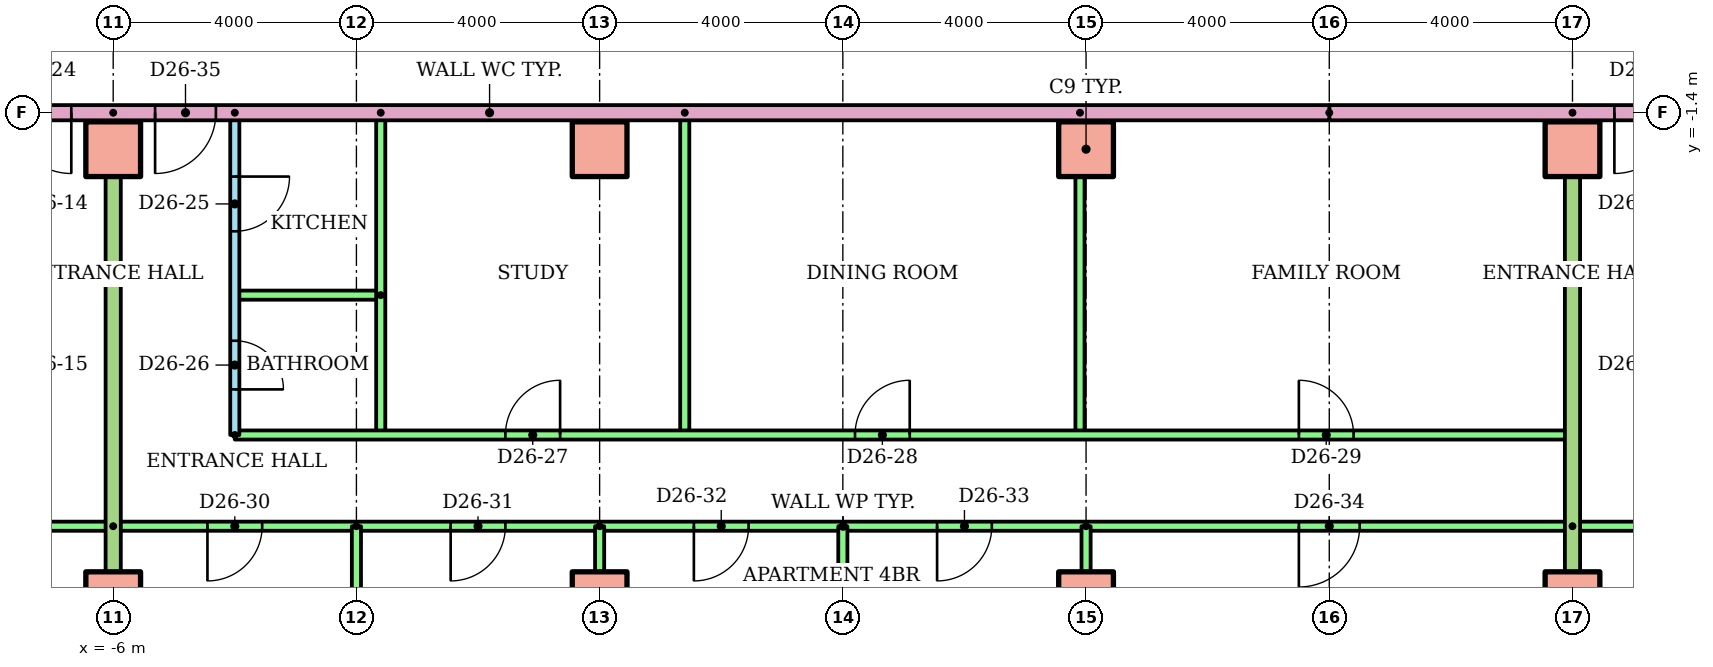
"""IFC4 building model, lengths in metres.
Left out: names, types, materials, properties, quantities, classifications, styles, units other than length and angle.
Written with IfcOpenShell. Run it as: python <this file> out.ifc"""

import sys

from ifc_helpers import new_model, si_unit, direction, frame, frame_2d, origin, origin_2d, place, context, subcontext, project, spatial, rectangle, extrude, element, fill, save


model = new_model("IFC4")
c1 = context("Model", 3, precision=1e-05, world=origin(), true_north=direction((0.0, 1.0)))
c2 = subcontext(c1, "Body", "Model", "MODEL_VIEW")
j1 = project(units=[si_unit("LENGTHUNIT", "METRE"), si_unit("PLANEANGLEUNIT", "RADIAN")], contexts=[c1])
p1 = place(None, origin())
s1 = spatial("IfcSite", under=j1, at=p1, CompositionType="ELEMENT")
p2 = place(p1, origin())
s2 = spatial("IfcBuilding", under=s1, at=p2, CompositionType="ELEMENT")
p3 = place(p2, frame((0.0, 0.0, 99.9)))
s3 = spatial("IfcBuildingStorey", under=s2, at=p3, CompositionType="ELEMENT", Elevation=99.9)
for number, where in (
    (1, (-6.0, -9.4, 0.0)),
    (2, (2.0, -9.4, 0.0)),
    (3, (10.0, -9.4, 0.0)),
    (4, (18.0, -9.4, 0.0)),
    (5, (-6.0, -2.0, 0.0)),
    (6, (2.0, -2.0, 0.0)),
    (7, (10.0, -2.0, 0.0)),
    (8, (18.0, -2.0, 0.0)),
):
    element("IfcColumn", number, at=place(p3, frame(where)), inside=s3, PredefinedType="COLUMN", context=c2, shape_type="SweptSolid", body=[
        extrude(rectangle(XDim=0.9, YDim=0.9, at=origin_2d()), origin(), (0.0, 0.0, 1.0), 3.2),
    ])
p4 = place(p3, frame((-6.0, -8.2, 0.0), z_axis=(0.0, 0.0, 1.0), x_axis=(-1.0, 0.0, 0.0)))
e9 = element("IfcWall", 9, at=p4, inside=s3, PredefinedType="PARTITIONING", context=c2, shape_type="SweptSolid", body=[
    extrude(rectangle(XDim=22.61, YDim=0.15, at=frame_2d((11.305, 0.0))), origin(), (0.0, 0.0, 1.0), 2.4),
])
p5 = place(p4, frame((19.7, 0.0, 0.0)))
e10 = element("IfcOpeningElement", 10, at=p5, cuts=e9, PredefinedType="OPENING", context=c2, shape_type="SweptSolid", body=[
    extrude(rectangle(XDim=0.9, YDim=2.1, at=frame_2d((0.45, 1.05))), frame((0.0, 0.085, 0.0), z_axis=(0.0, -1.0, 0.0), x_axis=(1.0, 0.0, 0.0)), (0.0, 0.0, 1.0), 0.17),
])
p6 = place(p4, frame((14.411, 0.0, 0.0)))
e11 = element("IfcOpeningElement", 11, at=p6, cuts=e9, PredefinedType="OPENING", context=c2, shape_type="SweptSolid", body=[
    extrude(rectangle(XDim=0.9, YDim=2.1, at=frame_2d((0.45, 1.05))), frame((0.0, 0.085, 0.0), z_axis=(0.0, -1.0, 0.0), x_axis=(1.0, 0.0, 0.0)), (0.0, 0.0, 1.0), 0.17),
])
p7 = place(p4, frame((9.55, 0.0, 0.0)))
e12 = element("IfcOpeningElement", 12, at=p7, cuts=e9, PredefinedType="OPENING", context=c2, shape_type="SweptSolid", body=[
    extrude(rectangle(XDim=0.9, YDim=2.1, at=frame_2d((0.45, 1.05))), frame((0.0, 0.085, 0.0), z_axis=(0.0, -1.0, 0.0), x_axis=(1.0, 0.0, 0.0)), (0.0, 0.0, 1.0), 0.17),
])
p8 = place(p4, frame((5.55, 0.0, 0.0)))
e13 = element("IfcOpeningElement", 13, at=p8, cuts=e9, PredefinedType="OPENING", context=c2, shape_type="SweptSolid", body=[
    extrude(rectangle(XDim=0.9, YDim=2.1, at=frame_2d((0.45, 1.05))), frame((0.0, 0.085, 0.0), z_axis=(0.0, -1.0, 0.0), x_axis=(1.0, 0.0, 0.0)), (0.0, 0.0, 1.0), 0.17),
])
p9 = place(p4, frame((1.5, 0.0, 0.0)))
e14 = element("IfcOpeningElement", 14, at=p9, cuts=e9, PredefinedType="OPENING", context=c2, shape_type="SweptSolid", body=[
    extrude(rectangle(XDim=1.0, YDim=2.1, at=frame_2d((0.5, 1.05))), frame((0.0, 0.085, 0.0), z_axis=(0.0, -1.0, 0.0), x_axis=(1.0, 0.0, 0.0)), (0.0, 0.0, 1.0), 0.17),
])
p10 = place(p3, frame((-4.0, -1.4, 0.0), z_axis=(0.0, 0.0, 1.0), x_axis=(0.0, -1.0, 0.0)))
e15 = element("IfcWall", 15, at=p10, inside=s3, PredefinedType="PARTITIONING", context=c2, shape_type="SweptSolid", body=[
    extrude(rectangle(XDim=5.3, YDim=0.15, at=frame_2d((2.65, 0.0))), origin(), (0.0, 0.0, 1.0), 2.4),
])
p11 = place(p10, frame((1.05, 0.0, 0.0)))
e16 = element("IfcOpeningElement", 16, at=p11, cuts=e15, PredefinedType="OPENING", context=c2, shape_type="SweptSolid", body=[
    extrude(rectangle(XDim=0.9, YDim=2.1, at=frame_2d((0.45, 1.05))), frame((0.0, 0.085, 0.0), z_axis=(0.0, -1.0, 0.0), x_axis=(1.0, 0.0, 0.0)), (0.0, 0.0, 1.0), 0.17),
])
p12 = place(p10, frame((3.75, 0.0, 0.0)))
e17 = element("IfcOpeningElement", 17, at=p12, cuts=e15, PredefinedType="OPENING", context=c2, shape_type="SweptSolid", body=[
    extrude(rectangle(XDim=0.8, YDim=2.1, at=frame_2d((0.4, 1.05))), frame((0.0, 0.085, 0.0), z_axis=(0.0, -1.0, 0.0), x_axis=(1.0, 0.0, 0.0)), (0.0, 0.0, 1.0), 0.17),
])
p13 = place(p3, frame((-1.6, -4.4, 0.0), z_axis=(0.0, 0.0, 1.0), x_axis=(-1.0, 0.0, 0.0)))
e18 = element("IfcWall", 18, at=p13, inside=s3, PredefinedType="PARTITIONING", context=c2, shape_type="SweptSolid", body=[
    extrude(rectangle(XDim=2.4, YDim=0.15, at=frame_2d((1.2, 0.0))), origin(), (0.0, 0.0, 1.0), 2.4),
])
for number, where, z_axis, x_axis in (
    (19, (-1.6, -1.4, 0.0), (0.0, 0.0, 1.0), (0.0, -1.0, 0.0)),
    (20, (3.4, -1.4, 0.0), (0.0, 0.0, 1.0), (0.0, -1.0, 0.0)),
    (21, (9.9, -1.4, 0.0), (0.0, 0.0, 1.0), (0.0, -1.0, 0.0)),
):
    element("IfcWall", number, at=place(p3, frame(where, z_axis=z_axis, x_axis=x_axis)), inside=s3, PredefinedType="PARTITIONING", context=c2, shape_type="SweptSolid", body=[
        extrude(rectangle(XDim=5.3, YDim=0.15, at=frame_2d((2.65, 0.0))), origin(), (0.0, 0.0, 1.0), 2.4),
    ])
p14 = place(p3, frame((-4.0, -6.7, 0.0)))
e22 = element("IfcWall", 22, at=p14, inside=s3, PredefinedType="PARTITIONING", context=c2, shape_type="SweptSolid", body=[
    extrude(rectangle(XDim=22.0, YDim=0.15, at=frame_2d((11.0, 0.0))), origin(), (0.0, 0.0, 1.0), 2.4),
])
p15 = place(p14, frame((4.45, 0.0, 0.0)))
e23 = element("IfcOpeningElement", 23, at=p15, cuts=e22, PredefinedType="OPENING", context=c2, shape_type="SweptSolid", body=[
    extrude(rectangle(XDim=0.9, YDim=2.1, at=frame_2d((0.45, 1.05))), frame((0.0, 0.085, 0.0), z_axis=(0.0, -1.0, 0.0), x_axis=(1.0, 0.0, 0.0)), (0.0, 0.0, 1.0), 0.17),
])
p16 = place(p14, frame((10.2, 0.0, 0.0)))
e24 = element("IfcOpeningElement", 24, at=p16, cuts=e22, PredefinedType="OPENING", context=c2, shape_type="SweptSolid", body=[
    extrude(rectangle(XDim=0.9, YDim=2.1, at=frame_2d((0.45, 1.05))), frame((0.0, 0.085, 0.0), z_axis=(0.0, -1.0, 0.0), x_axis=(1.0, 0.0, 0.0)), (0.0, 0.0, 1.0), 0.17),
])
p17 = place(p14, frame((17.5, 0.0, 0.0)))
e25 = element("IfcOpeningElement", 25, at=p17, cuts=e22, PredefinedType="OPENING", context=c2, shape_type="SweptSolid", body=[
    extrude(rectangle(XDim=0.9, YDim=2.1, at=frame_2d((0.45, 1.05))), frame((0.0, 0.085, 0.0), z_axis=(0.0, -1.0, 0.0), x_axis=(1.0, 0.0, 0.0)), (0.0, 0.0, 1.0), 0.17),
])
p18 = place(p3, frame((18.0, -8.2, 0.0), z_axis=(0.0, 0.0, 1.0), x_axis=(-1.0, 0.0, 0.0)))
e26 = element("IfcWall", 26, at=p18, inside=s3, PredefinedType="PARTITIONING", context=c2, shape_type="SweptSolid", body=[
    extrude(rectangle(XDim=24.0, YDim=0.15, at=frame_2d((12.0, 0.0))), origin(), (0.0, 0.0, 1.0), 2.4),
])
p19 = place(p18, frame((21.55, 0.0, 0.0)))
e27 = element("IfcOpeningElement", 27, at=p19, cuts=e26, PredefinedType="OPENING", context=c2, shape_type="SweptSolid", body=[
    extrude(rectangle(XDim=0.9, YDim=2.1, at=frame_2d((0.45, 1.05))), frame((0.0, 0.085, 0.0), z_axis=(0.0, -1.0, 0.0), x_axis=(1.0, 0.0, 0.0)), (0.0, 0.0, 1.0), 0.17),
])
p20 = place(p18, frame((17.55, 0.0, 0.0)))
e28 = element("IfcOpeningElement", 28, at=p20, cuts=e26, PredefinedType="OPENING", context=c2, shape_type="SweptSolid", body=[
    extrude(rectangle(XDim=0.9, YDim=2.1, at=frame_2d((0.45, 1.05))), frame((0.0, 0.085, 0.0), z_axis=(0.0, -1.0, 0.0), x_axis=(1.0, 0.0, 0.0)), (0.0, 0.0, 1.0), 0.17),
])
p21 = place(p18, frame((13.55, 0.0, 0.0)))
e29 = element("IfcOpeningElement", 29, at=p21, cuts=e26, PredefinedType="OPENING", context=c2, shape_type="SweptSolid", body=[
    extrude(rectangle(XDim=0.9, YDim=2.1, at=frame_2d((0.45, 1.05))), frame((0.0, 0.085, 0.0), z_axis=(0.0, -1.0, 0.0), x_axis=(1.0, 0.0, 0.0)), (0.0, 0.0, 1.0), 0.17),
])
p22 = place(p18, frame((9.55, 0.0, 0.0)))
e30 = element("IfcOpeningElement", 30, at=p22, cuts=e26, PredefinedType="OPENING", context=c2, shape_type="SweptSolid", body=[
    extrude(rectangle(XDim=0.9, YDim=2.1, at=frame_2d((0.45, 1.05))), frame((0.0, 0.085, 0.0), z_axis=(0.0, -1.0, 0.0), x_axis=(1.0, 0.0, 0.0)), (0.0, 0.0, 1.0), 0.17),
])
p23 = place(p18, frame((3.5, 0.0, 0.0)))
e31 = element("IfcOpeningElement", 31, at=p23, cuts=e26, PredefinedType="OPENING", context=c2, shape_type="SweptSolid", body=[
    extrude(rectangle(XDim=1.0, YDim=2.1, at=frame_2d((0.5, 1.05))), frame((0.0, 0.085, 0.0), z_axis=(0.0, -1.0, 0.0), x_axis=(1.0, 0.0, 0.0)), (0.0, 0.0, 1.0), 0.17),
])
p24 = place(p3, frame((-2.0, -8.2, 0.0), z_axis=(0.0, 0.0, 1.0), x_axis=(0.0, -1.0, 0.0)))
e32 = element("IfcWall", 32, at=p24, inside=s3, PredefinedType="PARTITIONING", context=c2, shape_type="SweptSolid", body=[
    extrude(rectangle(XDim=8.021, YDim=0.15, at=frame_2d((4.01, 0.0))), origin(), (0.0, 0.0, 1.0), 2.4),
])
p25 = place(p3, frame((2.0, -8.2, 0.0), z_axis=(0.0, 0.0, 1.0), x_axis=(0.0, -1.0, 0.0)))
e33 = element("IfcWall", 33, at=p25, inside=s3, PredefinedType="PARTITIONING", context=c2, shape_type="SweptSolid", body=[
    extrude(rectangle(XDim=8.01, YDim=0.15, at=frame_2d((4.005, 0.0))), origin(), (0.0, 0.0, 1.0), 2.4),
])
p26 = place(p3, frame((6.0, -8.2, 0.0), z_axis=(0.0, 0.0, 1.0), x_axis=(0.0, -1.0, 0.0)))
e34 = element("IfcWall", 34, at=p26, inside=s3, PredefinedType="PARTITIONING", context=c2, shape_type="SweptSolid", body=[
    extrude(rectangle(XDim=8.021, YDim=0.15, at=frame_2d((4.01, 0.0))), origin(), (0.0, 0.0, 1.0), 2.4),
])
p27 = place(p3, frame((10.0, -8.2, 0.0), z_axis=(0.0, 0.0, 1.0), x_axis=(0.0, -1.0, 0.0)))
e35 = element("IfcWall", 35, at=p27, inside=s3, PredefinedType="PARTITIONING", context=c2, shape_type="SweptSolid", body=[
    extrude(rectangle(XDim=8.01, YDim=0.15, at=frame_2d((4.005, 0.0))), origin(), (0.0, 0.0, 1.0), 2.4),
])
p28 = place(p3, frame((-6.0, -1.4, 0.0), z_axis=(0.0, 0.0, 1.0), x_axis=(0.0, -1.0, 0.0)))
e36 = element("IfcWall", 36, at=p28, inside=s3, PredefinedType="PARTITIONING", context=c2, shape_type="SweptSolid", body=[
    extrude(rectangle(XDim=14.81, YDim=0.25, at=frame_2d((7.405, 0.0))), origin(), (0.0, 0.0, 1.0), 2.4),
])
p29 = place(p3, frame((40.62, -8.2, 0.0), z_axis=(0.0, 0.0, 1.0), x_axis=(-1.0, 0.0, 0.0)))
e37 = element("IfcWall", 37, at=p29, inside=s3, PredefinedType="PARTITIONING", context=c2, shape_type="SweptSolid", body=[
    extrude(rectangle(XDim=22.62, YDim=0.15, at=frame_2d((11.31, 0.0))), origin(), (0.0, 0.0, 1.0), 2.4),
])
p30 = place(p29, frame((18.12, 0.0, 0.0)))
e38 = element("IfcOpeningElement", 38, at=p30, cuts=e37, PredefinedType="OPENING", context=c2, shape_type="SweptSolid", body=[
    extrude(rectangle(XDim=1.0, YDim=2.1, at=frame_2d((0.5, 1.05))), frame((0.0, 0.085, 0.0), z_axis=(0.0, -1.0, 0.0), x_axis=(1.0, 0.0, 0.0)), (0.0, 0.0, 1.0), 0.17),
])
p31 = place(p29, frame((12.17, 0.0, 0.0)))
e39 = element("IfcOpeningElement", 39, at=p31, cuts=e37, PredefinedType="OPENING", context=c2, shape_type="SweptSolid", body=[
    extrude(rectangle(XDim=0.9, YDim=2.1, at=frame_2d((0.45, 1.05))), frame((0.0, 0.085, 0.0), z_axis=(0.0, -1.0, 0.0), x_axis=(1.0, 0.0, 0.0)), (0.0, 0.0, 1.0), 0.17),
])
p32 = place(p29, frame((8.17, 0.0, 0.0)))
e40 = element("IfcOpeningElement", 40, at=p32, cuts=e37, PredefinedType="OPENING", context=c2, shape_type="SweptSolid", body=[
    extrude(rectangle(XDim=0.9, YDim=2.1, at=frame_2d((0.45, 1.05))), frame((0.0, 0.085, 0.0), z_axis=(0.0, -1.0, 0.0), x_axis=(1.0, 0.0, 0.0)), (0.0, 0.0, 1.0), 0.17),
])
p33 = place(p29, frame((2.97, 0.0, 0.0)))
e41 = element("IfcOpeningElement", 41, at=p33, cuts=e37, PredefinedType="OPENING", context=c2, shape_type="SweptSolid", body=[
    extrude(rectangle(XDim=0.9, YDim=2.1, at=frame_2d((0.45, 1.05))), frame((0.0, 0.085, 0.0), z_axis=(0.0, -1.0, 0.0), x_axis=(1.0, 0.0, 0.0)), (0.0, 0.0, 1.0), 0.17),
])
p34 = place(p3, frame((18.0, -1.4, 0.0), z_axis=(0.0, 0.0, 1.0), x_axis=(0.0, -1.0, 0.0)))
e42 = element("IfcWall", 42, at=p34, inside=s3, PredefinedType="PARTITIONING", context=c2, shape_type="SweptSolid", body=[
    extrude(rectangle(XDim=14.81, YDim=0.25, at=frame_2d((7.405, 0.0))), origin(), (0.0, 0.0, 1.0), 2.4),
])
p35 = place(p3, frame((29.0, -1.4, 0.0), z_axis=(0.0, 0.0, 1.0), x_axis=(-1.0, 0.0, 0.0)))
e43 = element("IfcWall", 43, at=p35, inside=s3, PredefinedType="PARTITIONING", context=c2, shape_type="SweptSolid", body=[
    extrude(rectangle(XDim=15.0, YDim=0.25, at=frame_2d((7.5, 0.0))), origin(), (0.0, 0.0, 1.0), 2.4),
])
p36 = place(p35, frame((9.311, 0.0, 0.0)))
e44 = element("IfcOpeningElement", 44, at=p36, cuts=e43, PredefinedType="OPENING", context=c2, shape_type="SweptSolid", body=[
    extrude(rectangle(XDim=1.0, YDim=2.1, at=frame_2d((0.5, 1.05))), frame((0.0, 0.135, 0.0), z_axis=(0.0, -1.0, 0.0), x_axis=(1.0, 0.0, 0.0)), (0.0, 0.0, 1.0), 0.27),
])
p37 = place(p3, frame((14.0, -1.4, 0.0), z_axis=(0.0, 0.0, 1.0), x_axis=(-1.0, 0.0, 0.0)))
e45 = element("IfcWall", 45, at=p37, inside=s3, PredefinedType="PARTITIONING", context=c2, shape_type="SweptSolid", body=[
    extrude(rectangle(XDim=28.0, YDim=0.25, at=frame_2d((14.0, 0.0))), origin(), (0.0, 0.0, 1.0), 2.4),
])
p38 = place(p37, frame((20.689, 0.0, 0.0)))
e46 = element("IfcOpeningElement", 46, at=p38, cuts=e45, PredefinedType="OPENING", context=c2, shape_type="SweptSolid", body=[
    extrude(rectangle(XDim=1.0, YDim=2.1, at=frame_2d((0.5, 1.05))), frame((0.0, 0.135, 0.0), z_axis=(0.0, -1.0, 0.0), x_axis=(1.0, 0.0, 0.0)), (0.0, 0.0, 1.0), 0.27),
])
p39 = place(p37, frame((18.311, 0.0, 0.0)))
e47 = element("IfcOpeningElement", 47, at=p39, cuts=e45, PredefinedType="OPENING", context=c2, shape_type="SweptSolid", body=[
    extrude(rectangle(XDim=1.0, YDim=2.1, at=frame_2d((0.5, 1.05))), frame((0.0, 0.135, 0.0), z_axis=(0.0, -1.0, 0.0), x_axis=(1.0, 0.0, 0.0)), (0.0, 0.0, 1.0), 0.27),
])
p40 = place(p38, origin())
e48 = element("IfcDoor", 48, at=p40, inside=s3, OperationType="SINGLE_SWING_LEFT", PredefinedType="DOOR", context=c2, shape_type="SweptSolid", body=[
    extrude(rectangle(XDim=1.0, YDim=2.1, at=frame_2d((0.5, 1.05))), frame((0.0, 0.025, 0.0), z_axis=(0.0, -1.0, 0.0), x_axis=(1.0, 0.0, 0.0)), (0.0, 0.0, 1.0), 0.05),
])
fill(e46, e48)
p41 = place(p11, origin())
e49 = element("IfcDoor", 49, at=p41, inside=s3, OperationType="SINGLE_SWING_LEFT", PredefinedType="DOOR", context=c2, shape_type="SweptSolid", body=[
    extrude(rectangle(XDim=0.9, YDim=2.1, at=frame_2d((0.45, 1.05))), frame((0.0, 0.025, 0.0), z_axis=(0.0, -1.0, 0.0), x_axis=(1.0, 0.0, 0.0)), (0.0, 0.0, 1.0), 0.05),
])
fill(e16, e49)
p42 = place(p12, origin())
e50 = element("IfcDoor", 50, at=p42, inside=s3, OperationType="SINGLE_SWING_RIGHT", PredefinedType="DOOR", context=c2, shape_type="SweptSolid", body=[
    extrude(rectangle(XDim=0.8, YDim=2.1, at=frame_2d((0.4, 1.05))), frame((0.0, 0.025, 0.0), z_axis=(0.0, -1.0, 0.0), x_axis=(1.0, 0.0, 0.0)), (0.0, 0.0, 1.0), 0.05),
])
fill(e17, e50)
p43 = place(p15, origin())
e51 = element("IfcDoor", 51, at=p43, inside=s3, OperationType="SINGLE_SWING_RIGHT", PredefinedType="DOOR", context=c2, shape_type="SweptSolid", body=[
    extrude(rectangle(XDim=0.9, YDim=2.1, at=frame_2d((0.45, 1.05))), frame((0.0, 0.025, 0.0), z_axis=(0.0, -1.0, 0.0), x_axis=(1.0, 0.0, 0.0)), (0.0, 0.0, 1.0), 0.05),
])
fill(e23, e51)
p44 = place(p16, origin())
e52 = element("IfcDoor", 52, at=p44, inside=s3, OperationType="SINGLE_SWING_RIGHT", PredefinedType="DOOR", context=c2, shape_type="SweptSolid", body=[
    extrude(rectangle(XDim=0.9, YDim=2.1, at=frame_2d((0.45, 1.05))), frame((0.0, 0.025, 0.0), z_axis=(0.0, -1.0, 0.0), x_axis=(1.0, 0.0, 0.0)), (0.0, 0.0, 1.0), 0.05),
])
fill(e24, e52)
p45 = place(p17, origin())
e53 = element("IfcDoor", 53, at=p45, inside=s3, OperationType="SINGLE_SWING_LEFT", PredefinedType="DOOR", context=c2, shape_type="SweptSolid", body=[
    extrude(rectangle(XDim=0.9, YDim=2.1, at=frame_2d((0.45, 1.05))), frame((0.0, 0.025, 0.0), z_axis=(0.0, -1.0, 0.0), x_axis=(1.0, 0.0, 0.0)), (0.0, 0.0, 1.0), 0.05),
])
fill(e25, e53)
p46 = place(p19, origin())
e54 = element("IfcDoor", 54, at=p46, inside=s3, OperationType="SINGLE_SWING_RIGHT", PredefinedType="DOOR", context=c2, shape_type="SweptSolid", body=[
    extrude(rectangle(XDim=0.9, YDim=2.1, at=frame_2d((0.45, 1.05))), frame((0.0, 0.025, 0.0), z_axis=(0.0, -1.0, 0.0), x_axis=(1.0, 0.0, 0.0)), (0.0, 0.0, 1.0), 0.05),
])
fill(e27, e54)
p47 = place(p20, origin())
e55 = element("IfcDoor", 55, at=p47, inside=s3, OperationType="SINGLE_SWING_RIGHT", PredefinedType="DOOR", context=c2, shape_type="SweptSolid", body=[
    extrude(rectangle(XDim=0.9, YDim=2.1, at=frame_2d((0.45, 1.05))), frame((0.0, 0.025, 0.0), z_axis=(0.0, -1.0, 0.0), x_axis=(1.0, 0.0, 0.0)), (0.0, 0.0, 1.0), 0.05),
])
fill(e28, e55)
p48 = place(p21, origin())
e56 = element("IfcDoor", 56, at=p48, inside=s3, OperationType="SINGLE_SWING_RIGHT", PredefinedType="DOOR", context=c2, shape_type="SweptSolid", body=[
    extrude(rectangle(XDim=0.9, YDim=2.1, at=frame_2d((0.45, 1.05))), frame((0.0, 0.025, 0.0), z_axis=(0.0, -1.0, 0.0), x_axis=(1.0, 0.0, 0.0)), (0.0, 0.0, 1.0), 0.05),
])
fill(e29, e56)
p49 = place(p22, origin())
e57 = element("IfcDoor", 57, at=p49, inside=s3, OperationType="SINGLE_SWING_RIGHT", PredefinedType="DOOR", context=c2, shape_type="SweptSolid", body=[
    extrude(rectangle(XDim=0.9, YDim=2.1, at=frame_2d((0.45, 1.05))), frame((0.0, 0.025, 0.0), z_axis=(0.0, -1.0, 0.0), x_axis=(1.0, 0.0, 0.0)), (0.0, 0.0, 1.0), 0.05),
])
fill(e30, e57)
p50 = place(p23, origin())
e58 = element("IfcDoor", 58, at=p50, inside=s3, OperationType="SINGLE_SWING_RIGHT", PredefinedType="DOOR", context=c2, shape_type="SweptSolid", body=[
    extrude(rectangle(XDim=1.0, YDim=2.1, at=frame_2d((0.5, 1.05))), frame((0.0, 0.025, 0.0), z_axis=(0.0, -1.0, 0.0), x_axis=(1.0, 0.0, 0.0)), (0.0, 0.0, 1.0), 0.05),
])
fill(e31, e58)
p51 = place(p39, origin())
e59 = element("IfcDoor", 59, at=p51, inside=s3, OperationType="SINGLE_SWING_RIGHT", PredefinedType="DOOR", context=c2, shape_type="SweptSolid", body=[
    extrude(rectangle(XDim=1.0, YDim=2.1, at=frame_2d((0.5, 1.05))), frame((0.0, 0.025, 0.0), z_axis=(0.0, -1.0, 0.0), x_axis=(1.0, 0.0, 0.0)), (0.0, 0.0, 1.0), 0.05),
])
fill(e47, e59)
p52 = place(p36, origin())
e60 = element("IfcDoor", 60, at=p52, inside=s3, OperationType="SINGLE_SWING_RIGHT", PredefinedType="DOOR", context=c2, shape_type="SweptSolid", body=[
    extrude(rectangle(XDim=1.0, YDim=2.1, at=frame_2d((0.5, 1.05))), frame((0.0, 0.025, 0.0), z_axis=(0.0, -1.0, 0.0), x_axis=(1.0, 0.0, 0.0)), (0.0, 0.0, 1.0), 0.05),
])
fill(e44, e60)
save(model, sys.argv[1])
